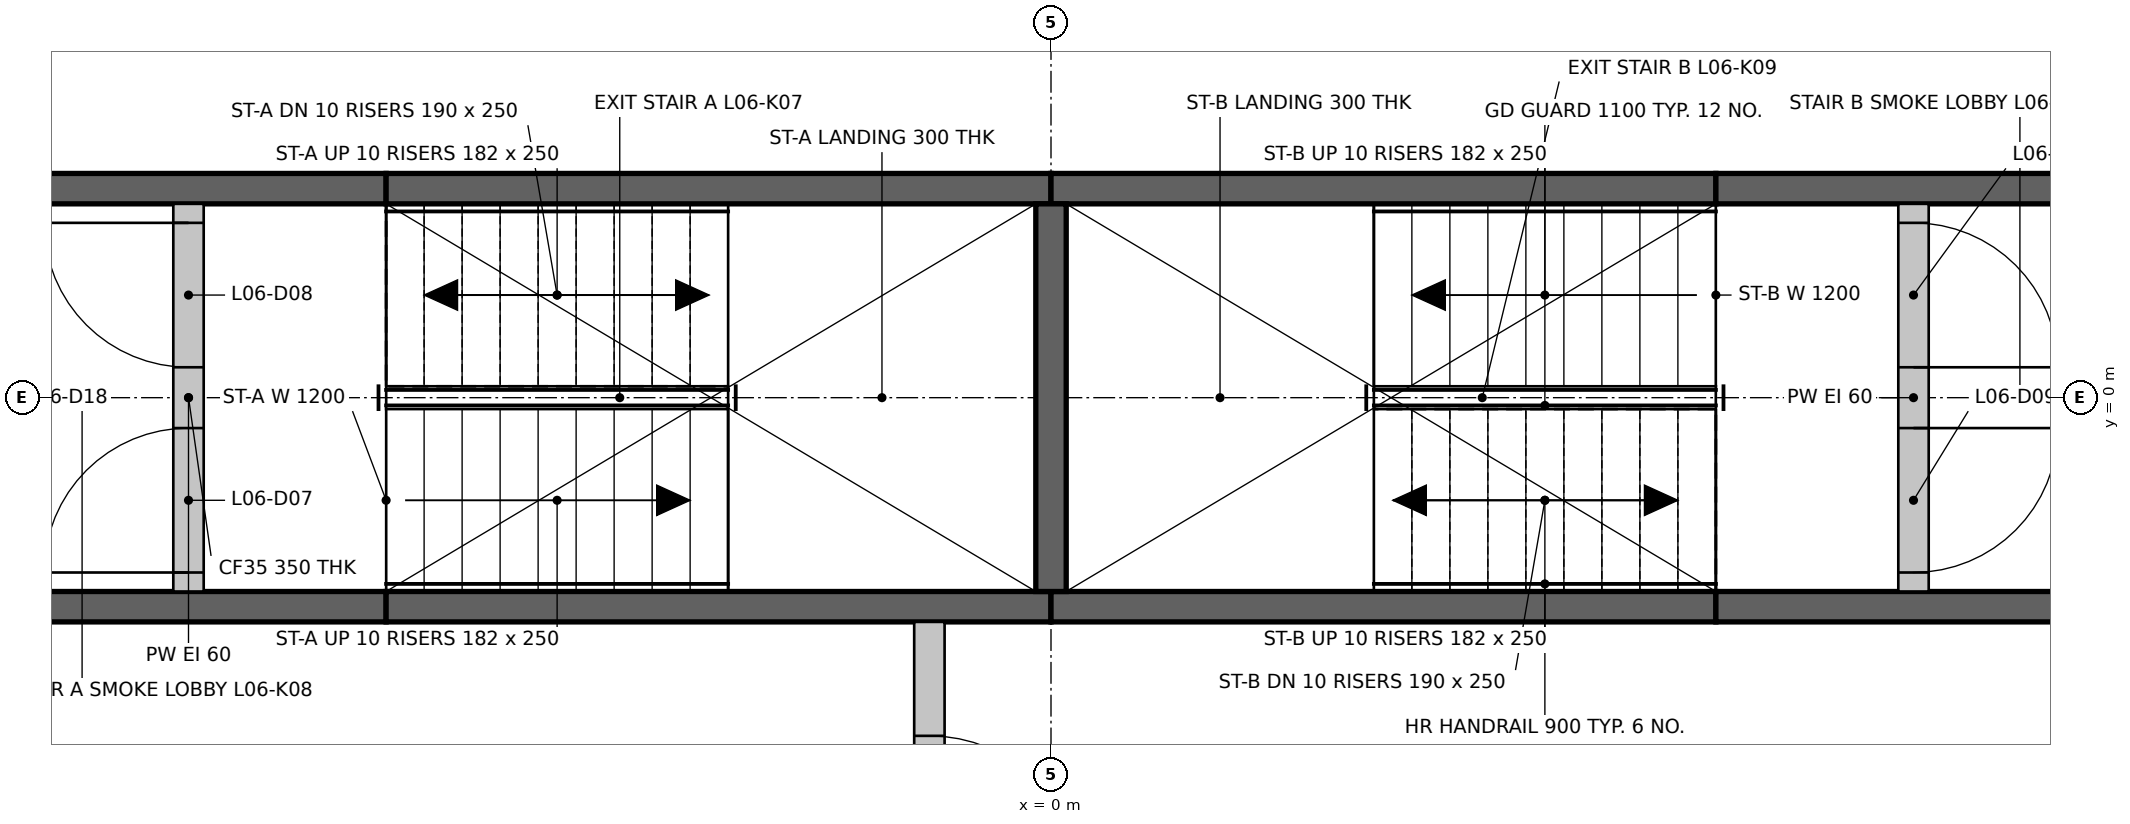
"""IFC4 building model, lengths in metres.
Left out: names, types, materials, properties, quantities, classifications, styles, units other than length and angle.
Written with IfcOpenShell. Run it as: python <this file> out.ifc"""

import sys

from ifc_helpers import new_model, si_unit, direction, frame, frame_2d, origin, place, context, subcontext, project, spatial, rectangle, extrude, element, fill, save


model = new_model("IFC4")
c1 = context("Model", 3, precision=1e-05, world=origin(), true_north=direction((0.0, 1.0)))
c2 = subcontext(c1, "Body", "Model", "MODEL_VIEW")
j1 = project(units=[si_unit("LENGTHUNIT", "METRE"), si_unit("PLANEANGLEUNIT", "RADIAN")], contexts=[c1])
p1 = place(None, origin())
s1 = spatial("IfcSite", under=j1, at=p1, CompositionType="ELEMENT")
p2 = place(p1, origin())
s2 = spatial("IfcBuilding", under=s1, at=p2, CompositionType="ELEMENT")
p3 = place(p2, frame((0.0, 0.0, 26.2)))
s3 = spatial("IfcBuildingStorey", under=s2, at=p3, CompositionType="ELEMENT", Elevation=26.2)
p4 = place(p3, frame((-6.974, -1.375, 0.0), z_axis=(0.0, 0.0, 1.0), x_axis=(1.0, 0.0, 0.0)))
e1 = element("IfcWall", 1, at=p4, inside=s3, PredefinedType="SHEAR", context=c2, shape_type="SweptSolid", body=[
    extrude(rectangle(XDim=2.6, YDim=0.2, at=frame_2d((1.3, 0.0))), origin(), (0.0, 0.0, 1.0), 3.3),
])
for number, where, z_axis, x_axis in (
    (2, (-4.374, -1.375, 0.0), (0.0, 0.0, 1.0), (1.0, 0.0, 0.0)),
    (3, (0.0, -1.375, 0.0), (0.0, 0.0, 1.0), (1.0, 0.0, 0.0)),
):
    element("IfcWall", number, at=place(p3, frame(where, z_axis=z_axis, x_axis=x_axis)), inside=s3, PredefinedType="SHEAR", context=c2, shape_type="SweptSolid", body=[
        extrude(rectangle(XDim=4.374, YDim=0.2, at=frame_2d((2.187, 0.0))), origin(), (0.0, 0.0, 1.0), 3.3),
    ])
for number, where, z_axis, x_axis in (
    (4, (4.374, -1.375, 0.0), (0.0, 0.0, 1.0), (1.0, 0.0, 0.0)),
    (5, (-6.974, 1.375, 0.0), (0.0, 0.0, 1.0), (1.0, 0.0, 0.0)),
):
    element("IfcWall", number, at=place(p3, frame(where, z_axis=z_axis, x_axis=x_axis)), inside=s3, PredefinedType="SHEAR", context=c2, shape_type="SweptSolid", body=[
        extrude(rectangle(XDim=2.6, YDim=0.2, at=frame_2d((1.3, 0.0))), origin(), (0.0, 0.0, 1.0), 3.3),
    ])
for number, where, z_axis, x_axis in (
    (6, (-4.374, 1.375, 0.0), (0.0, 0.0, 1.0), (1.0, 0.0, 0.0)),
    (7, (0.0, 1.375, 0.0), (0.0, 0.0, 1.0), (1.0, 0.0, 0.0)),
):
    element("IfcWall", number, at=place(p3, frame(where, z_axis=z_axis, x_axis=x_axis)), inside=s3, PredefinedType="SHEAR", context=c2, shape_type="SweptSolid", body=[
        extrude(rectangle(XDim=4.374, YDim=0.2, at=frame_2d((2.187, 0.0))), origin(), (0.0, 0.0, 1.0), 3.3),
    ])
p5 = place(p3, frame((4.374, 1.375, 0.0), z_axis=(0.0, 0.0, 1.0), x_axis=(1.0, 0.0, 0.0)))
e8 = element("IfcWall", 8, at=p5, inside=s3, PredefinedType="SHEAR", context=c2, shape_type="SweptSolid", body=[
    extrude(rectangle(XDim=2.6, YDim=0.2, at=frame_2d((1.3, 0.0))), origin(), (0.0, 0.0, 1.0), 3.3),
])
p6 = place(p3, frame((0.0, -1.275, 0.0), z_axis=(0.0, 0.0, 1.0), x_axis=(0.0, 1.0, 0.0)))
e9 = element("IfcWall", 9, at=p6, inside=s3, PredefinedType="SHEAR", context=c2, shape_type="SweptSolid", body=[
    extrude(rectangle(XDim=2.55, YDim=0.2, at=frame_2d((1.275, 0.0))), origin(), (0.0, 0.0, 1.0), 3.3),
])
p7 = place(p3, frame((-0.8, -3.974, 0.0), z_axis=(0.0, 0.0, 1.0), x_axis=(0.0, 1.0, 0.0)))
e10 = element("IfcWall", 10, at=p7, inside=s3, PredefinedType="PARTITIONING", context=c2, shape_type="SweptSolid", body=[
    extrude(rectangle(XDim=2.499, YDim=0.2, at=frame_2d((1.25, 0.0))), origin(), (0.0, 0.0, 1.0), 3.3),
])
p8 = place(p7, frame((0.75, 0.0, 0.0)))
e11 = element("IfcOpeningElement", 11, at=p8, cuts=e10, PredefinedType="OPENING", context=c2, shape_type="SweptSolid", body=[
    extrude(rectangle(XDim=1.0, YDim=2.1, at=frame_2d((0.5, 1.05))), frame((0.0, 0.11, 0.0), z_axis=(0.0, -1.0, 0.0), x_axis=(1.0, 0.0, 0.0)), (0.0, 0.0, 1.0), 0.22),
])
p9 = place(p3, frame((-5.674, -1.275, 0.0), z_axis=(0.0, 0.0, 1.0), x_axis=(0.0, 1.0, 0.0)))
e12 = element("IfcWall", 12, at=p9, inside=s3, PredefinedType="PARTITIONING", context=c2, shape_type="SweptSolid", body=[
    extrude(rectangle(XDim=2.55, YDim=0.2, at=frame_2d((1.275, 0.0))), origin(), (0.0, 0.0, 1.0), 3.3),
])
p10 = place(p9, frame((0.125, 0.0, 0.0)))
e13 = element("IfcOpeningElement", 13, at=p10, cuts=e12, PredefinedType="OPENING", context=c2, shape_type="SweptSolid", body=[
    extrude(rectangle(XDim=0.95, YDim=2.1, at=frame_2d((0.475, 1.05))), frame((0.0, 0.11, 0.0), z_axis=(0.0, -1.0, 0.0), x_axis=(1.0, 0.0, 0.0)), (0.0, 0.0, 1.0), 0.22),
])
p11 = place(p9, frame((1.475, 0.0, 0.0)))
e14 = element("IfcOpeningElement", 14, at=p11, cuts=e12, PredefinedType="OPENING", context=c2, shape_type="SweptSolid", body=[
    extrude(rectangle(XDim=0.95, YDim=2.1, at=frame_2d((0.475, 1.05))), frame((0.0, 0.11, 0.0), z_axis=(0.0, -1.0, 0.0), x_axis=(1.0, 0.0, 0.0)), (0.0, 0.0, 1.0), 0.22),
])
p12 = place(p3, frame((5.674, -1.275, 0.0), z_axis=(0.0, 0.0, 1.0), x_axis=(0.0, 1.0, 0.0)))
e15 = element("IfcWall", 15, at=p12, inside=s3, PredefinedType="PARTITIONING", context=c2, shape_type="SweptSolid", body=[
    extrude(rectangle(XDim=2.55, YDim=0.2, at=frame_2d((1.275, 0.0))), origin(), (0.0, 0.0, 1.0), 3.3),
])
p13 = place(p12, frame((0.125, 0.0, 0.0)))
e16 = element("IfcOpeningElement", 16, at=p13, cuts=e15, PredefinedType="OPENING", context=c2, shape_type="SweptSolid", body=[
    extrude(rectangle(XDim=0.95, YDim=2.1, at=frame_2d((0.475, 1.05))), frame((0.0, 0.11, 0.0), z_axis=(0.0, -1.0, 0.0), x_axis=(1.0, 0.0, 0.0)), (0.0, 0.0, 1.0), 0.22),
])
p14 = place(p12, frame((1.475, 0.0, 0.0)))
e17 = element("IfcOpeningElement", 17, at=p14, cuts=e15, PredefinedType="OPENING", context=c2, shape_type="SweptSolid", body=[
    extrude(rectangle(XDim=0.95, YDim=2.1, at=frame_2d((0.475, 1.05))), frame((0.0, 0.11, 0.0), z_axis=(0.0, -1.0, 0.0), x_axis=(1.0, 0.0, 0.0)), (0.0, 0.0, 1.0), 0.22),
])
p15 = place(p10, origin())
e18 = element("IfcDoor", 18, at=p15, inside=s3, OperationType="SINGLE_SWING_LEFT", PredefinedType="DOOR", context=c2, shape_type="SweptSolid", body=[
    extrude(rectangle(XDim=0.95, YDim=2.1, at=frame_2d((0.475, 1.05))), frame((0.0, 0.025, 0.0), z_axis=(0.0, -1.0, 0.0), x_axis=(1.0, 0.0, 0.0)), (0.0, 0.0, 1.0), 0.05),
])
fill(e13, e18)
p16 = place(p11, origin())
e19 = element("IfcDoor", 19, at=p16, inside=s3, OperationType="SINGLE_SWING_RIGHT", PredefinedType="DOOR", context=c2, shape_type="SweptSolid", body=[
    extrude(rectangle(XDim=0.95, YDim=2.1, at=frame_2d((0.475, 1.05))), frame((0.0, 0.025, 0.0), z_axis=(0.0, -1.0, 0.0), x_axis=(1.0, 0.0, 0.0)), (0.0, 0.0, 1.0), 0.05),
])
fill(e14, e19)
p17 = place(p13, frame((0.95, 0.0, 0.0), z_axis=(0.0, 0.0, 1.0), x_axis=(-1.0, 0.0, 0.0)))
e20 = element("IfcDoor", 20, at=p17, inside=s3, OperationType="SINGLE_SWING_RIGHT", PredefinedType="DOOR", context=c2, shape_type="SweptSolid", body=[
    extrude(rectangle(XDim=0.95, YDim=2.1, at=frame_2d((0.475, 1.05))), frame((0.0, 0.025, 0.0), z_axis=(0.0, -1.0, 0.0), x_axis=(1.0, 0.0, 0.0)), (0.0, 0.0, 1.0), 0.05),
])
fill(e16, e20)
p18 = place(p14, frame((0.95, 0.0, 0.0), z_axis=(0.0, 0.0, 1.0), x_axis=(-1.0, 0.0, 0.0)))
e21 = element("IfcDoor", 21, at=p18, inside=s3, OperationType="SINGLE_SWING_LEFT", PredefinedType="DOOR", context=c2, shape_type="SweptSolid", body=[
    extrude(rectangle(XDim=0.95, YDim=2.1, at=frame_2d((0.475, 1.05))), frame((0.0, 0.025, 0.0), z_axis=(0.0, -1.0, 0.0), x_axis=(1.0, 0.0, 0.0)), (0.0, 0.0, 1.0), 0.05),
])
fill(e17, e21)
p19 = place(p8, frame((1.0, 0.0, 0.0), z_axis=(0.0, 0.0, 1.0), x_axis=(-1.0, 0.0, 0.0)))
e22 = element("IfcDoor", 22, at=p19, inside=s3, OperationType="SINGLE_SWING_LEFT", PredefinedType="DOOR", context=c2, shape_type="SweptSolid", body=[
    extrude(rectangle(XDim=1.0, YDim=2.1, at=frame_2d((0.5, 1.05))), frame((0.0, 0.025, 0.0), z_axis=(0.0, -1.0, 0.0), x_axis=(1.0, 0.0, 0.0)), (0.0, 0.0, 1.0), 0.05),
])
fill(e11, e22)
save(model, sys.argv[1])
